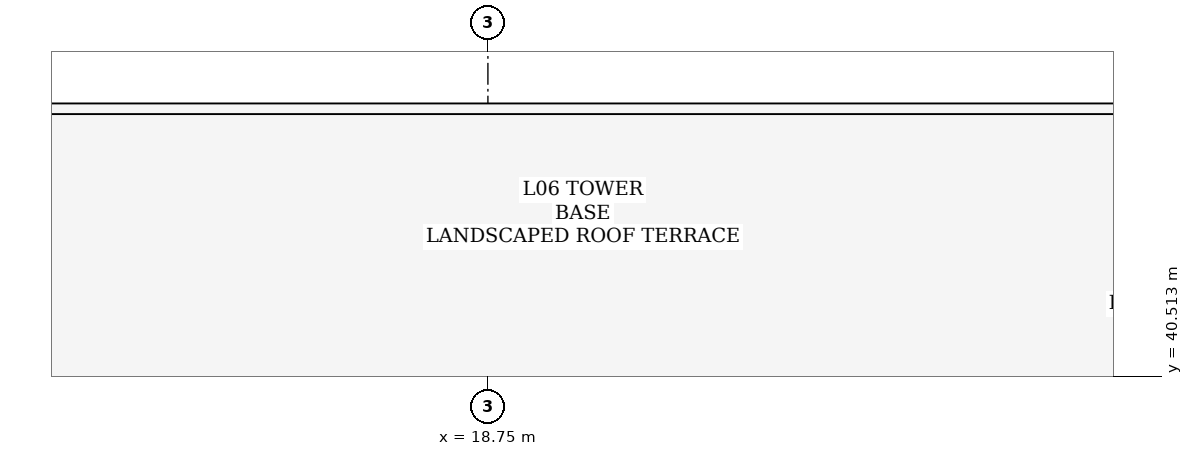
"""IFC4 building model, lengths in metres.
Left out: names, types, materials, properties, quantities, classifications, styles, units other than length and angle.
Written with IfcOpenShell. Run it as: python <this file> out.ifc"""

import sys

from ifc_helpers import new_model, si_unit, direction, frame, frame_2d, origin, place, context, subcontext, project, spatial, rectangle, extrude, element, save


model = new_model("IFC4")
c1 = context("Model", 3, precision=1e-05, world=origin(), true_north=direction((0.0, 1.0)))
c2 = subcontext(c1, "Body", "Model", "MODEL_VIEW")
j1 = project(units=[si_unit("LENGTHUNIT", "METRE"), si_unit("PLANEANGLEUNIT", "RADIAN")], contexts=[c1])
p1 = place(None, origin())
s1 = spatial("IfcSite", under=j1, at=p1, CompositionType="ELEMENT")
p2 = place(p1, origin())
s2 = spatial("IfcBuilding", under=s1, at=p2, CompositionType="ELEMENT")
p3 = place(p2, frame((0.0, 0.0, 27.3)))
s3 = spatial("IfcBuildingStorey", under=s2, at=p3, CompositionType="ELEMENT", Elevation=27.3)
p4 = place(p3, frame((29.452, 43.64, 0.0), z_axis=(0.0, 0.0, 1.0), x_axis=(-0.50000660679, -0.866021589319, 0.0)))
e1 = element("IfcWall", 1, at=p4, inside=s3, PredefinedType="SOLIDWALL", context=c2, shape_type="SweptSolid", body=[
    extrude(rectangle(XDim=32.724, YDim=0.34, at=frame_2d((16.362, 0.0))), origin(), (0.0, 0.0, 1.0), 2.494),
])
p5 = place(p4, frame((2.05, 0.0, 0.0)))
e2 = element("IfcOpeningElement", 2, at=p5, cuts=e1, PredefinedType="OPENING", context=c2, shape_type="SweptSolid", body=[
    extrude(rectangle(XDim=1.6, YDim=2.2, at=frame_2d((0.8, 1.1))), frame((0.0, 0.17, 0.0), z_axis=(0.0, -1.0, 0.0), x_axis=(1.0, 0.0, 0.0)), (0.0, 0.0, 1.0), 0.34),
])
p6 = place(p4, frame((24.19, 0.0, 0.85)))
e3 = element("IfcOpeningElement", 3, at=p6, cuts=e1, PredefinedType="OPENING", context=c2, shape_type="SweptSolid", body=[
    extrude(rectangle(XDim=1.2, YDim=1.48, at=frame_2d((0.6, 0.74))), frame((0.0, 0.17, 0.0), z_axis=(0.0, -1.0, 0.0), x_axis=(1.0, 0.0, 0.0)), (0.0, 0.0, 1.0), 0.34),
])
p7 = place(p4, frame((29.073, 0.0, 0.85)))
e4 = element("IfcOpeningElement", 4, at=p7, cuts=e1, PredefinedType="OPENING", context=c2, shape_type="SweptSolid", body=[
    extrude(rectangle(XDim=2.4, YDim=1.534, at=frame_2d((1.2, 0.767))), frame((0.0, 0.17, 0.0), z_axis=(0.0, -1.0, 0.0), x_axis=(1.0, 0.0, 0.0)), (0.0, 0.0, 1.0), 0.34),
])
p8 = place(p4, frame((10.766, 0.0, 0.85)))
e5 = element("IfcOpeningElement", 5, at=p8, cuts=e1, PredefinedType="OPENING", context=c2, shape_type="SweptSolid", body=[
    extrude(rectangle(XDim=2.5, YDim=1.534, at=frame_2d((1.25, 0.767))), frame((0.0, 0.17, 0.0), z_axis=(0.0, -1.0, 0.0), x_axis=(1.0, 0.0, 0.0)), (0.0, 0.0, 1.0), 0.34),
])
p9 = place(p4, frame((17.741, 0.0, 0.85)))
e6 = element("IfcOpeningElement", 6, at=p9, cuts=e1, PredefinedType="OPENING", context=c2, shape_type="SweptSolid", body=[
    extrude(rectangle(XDim=2.4, YDim=1.534, at=frame_2d((1.2, 0.767))), frame((0.0, 0.17, 0.0), z_axis=(0.0, -1.0, 0.0), x_axis=(1.0, 0.0, 0.0)), (0.0, 0.0, 1.0), 0.34),
])
p10 = place(p4, frame((0.759, 0.0, 0.85)))
e7 = element("IfcOpeningElement", 7, at=p10, cuts=e1, PredefinedType="OPENING", context=c2, shape_type="SweptSolid", body=[
    extrude(rectangle(XDim=1.2, YDim=1.48, at=frame_2d((0.6, 0.74))), frame((0.0, 0.17, 0.0), z_axis=(0.0, -1.0, 0.0), x_axis=(1.0, 0.0, 0.0)), (0.0, 0.0, 1.0), 0.34),
])
save(model, sys.argv[1])
